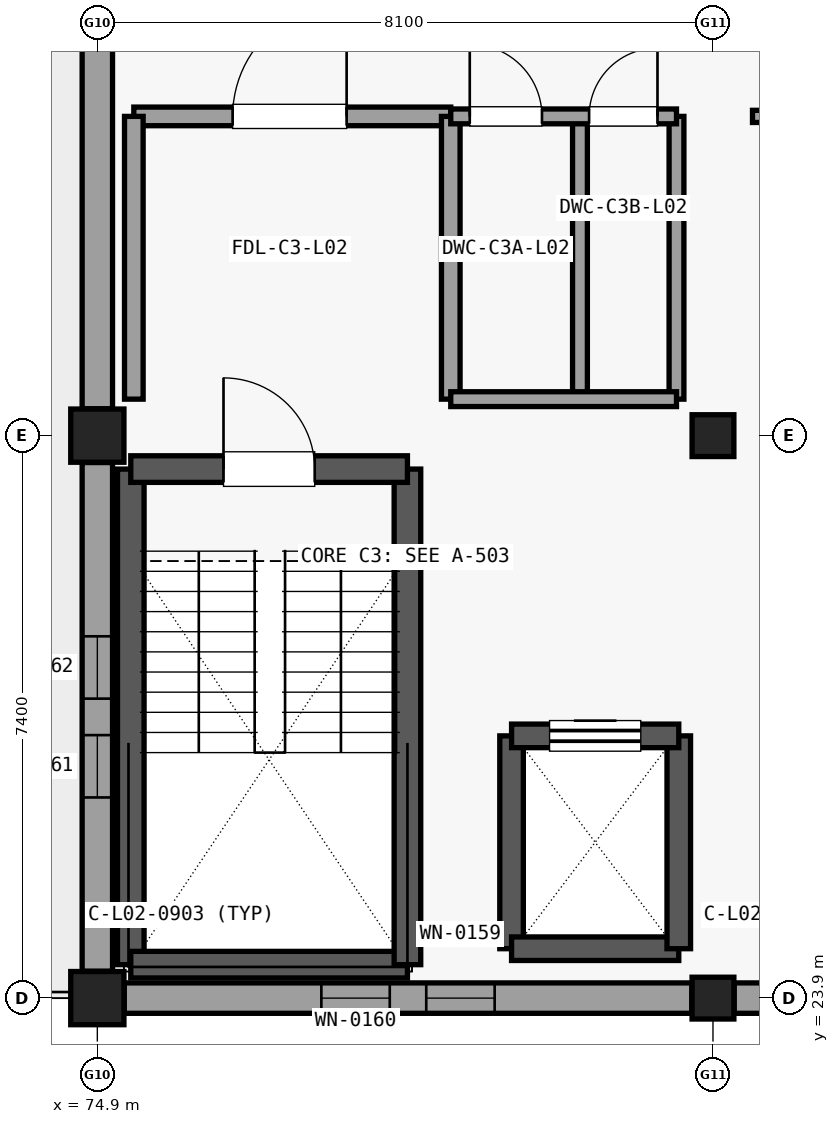
"""IFC4 building model, lengths in metres.
Left out: names, types, materials, properties, quantities, classifications, styles, units other than length and angle.
Written with IfcOpenShell. Run it as: python <this file> out.ifc"""

import sys

from ifc_helpers import new_model, si_unit, direction, frame, frame_2d, origin, origin_2d, place, context, subcontext, project, spatial, rectangle, extrude, element, fill, save


model = new_model("IFC4")
c1 = context("Model", 3, precision=1e-05, world=origin(), true_north=direction((0.0, 1.0)))
c2 = subcontext(c1, "Body", "Model", "MODEL_VIEW")
j1 = project(units=[si_unit("LENGTHUNIT", "METRE"), si_unit("PLANEANGLEUNIT", "RADIAN")], contexts=[c1])
p1 = place(None, origin())
s1 = spatial("IfcSite", under=j1, at=p1, CompositionType="ELEMENT")
p2 = place(p1, origin())
s2 = spatial("IfcBuilding", under=s1, at=p2, CompositionType="ELEMENT")
p3 = place(p2, frame((0.0, 0.0, 10.2)))
s3 = spatial("IfcBuildingStorey", under=s2, at=p3, CompositionType="ELEMENT", Elevation=10.2)
for number, where, z_axis, x_axis in (
    (1, (74.9, 23.9, 0.0), (0.0, 0.0, 1.0), (1.0, 0.0, 0.0)),
    (2, (74.9, 31.3, 0.0), (0.0, 0.0, 1.0), (1.0, 0.0, 0.0)),
):
    element("IfcColumn", number, at=place(p3, frame(where, z_axis=z_axis, x_axis=x_axis)), inside=s3, PredefinedType="COLUMN", context=c2, shape_type="SweptSolid", body=[
        extrude(rectangle(XDim=0.7, YDim=0.7, at=origin_2d()), origin(), (0.0, 0.0, 1.0), 3.37),
    ])
for number, where, z_axis, x_axis in (
    (3, (83.0, 23.9, 0.0), (0.0, 0.0, 1.0), (1.0, 0.0, 0.0)),
    (4, (83.0, 31.3, 0.0), (0.0, 0.0, 1.0), (1.0, 0.0, 0.0)),
):
    element("IfcColumn", number, at=place(p3, frame(where, z_axis=z_axis, x_axis=x_axis)), inside=s3, PredefinedType="COLUMN", context=c2, shape_type="SweptSolid", body=[
        extrude(rectangle(XDim=0.55, YDim=0.55, at=origin_2d()), origin(), (0.0, 0.0, 1.0), 3.37),
    ])
p4 = place(p3, frame((82.721, 23.9, 0.0), z_axis=(0.0, 0.0, 1.0), x_axis=(-1.0, 0.0, 0.0)))
e5 = element("IfcWall", 5, at=p4, inside=s3, PredefinedType="SOLIDWALL", context=c2, shape_type="SweptSolid", body=[
    extrude(rectangle(XDim=7.467, YDim=0.4, at=frame_2d((3.733, 0.0))), origin(), (0.0, 0.0, 1.0), 2.822),
])
p5 = place(p4, frame((2.594, 0.0, 0.6)))
e6 = element("IfcOpeningElement", 6, at=p5, cuts=e5, PredefinedType="OPENING", context=c2, shape_type="SweptSolid", body=[
    extrude(rectangle(XDim=0.9, YDim=1.98, at=frame_2d((0.45, 0.99))), frame((0.0, 0.21, 0.0), z_axis=(0.0, -1.0, 0.0), x_axis=(1.0, 0.0, 0.0)), (0.0, 0.0, 1.0), 0.42),
])
p6 = place(p4, frame((3.973, 0.0, 0.6)))
e7 = element("IfcOpeningElement", 7, at=p6, cuts=e5, PredefinedType="OPENING", context=c2, shape_type="SweptSolid", body=[
    extrude(rectangle(XDim=0.9, YDim=1.98, at=frame_2d((0.45, 0.99))), frame((0.0, 0.21, 0.0), z_axis=(0.0, -1.0, 0.0), x_axis=(1.0, 0.0, 0.0)), (0.0, 0.0, 1.0), 0.42),
])
p7 = place(p3, frame((74.9, 24.254, 0.0), z_axis=(0.0, 0.0, 1.0), x_axis=(0.0, 1.0, 0.0)))
e8 = element("IfcWall", 8, at=p7, inside=s3, PredefinedType="SOLIDWALL", context=c2, shape_type="SweptSolid", body=[
    extrude(rectangle(XDim=6.692, YDim=0.4, at=frame_2d((3.346, 0.0))), origin(), (0.0, 0.0, 1.0), 2.822),
])
p8 = place(p7, frame((2.286, 0.0, 0.6)))
e9 = element("IfcOpeningElement", 9, at=p8, cuts=e8, PredefinedType="OPENING", context=c2, shape_type="SweptSolid", body=[
    extrude(rectangle(XDim=0.82, YDim=2.0, at=frame_2d((0.41, 1.0))), frame((0.0, 0.21, 0.0), z_axis=(0.0, -1.0, 0.0), x_axis=(1.0, 0.0, 0.0)), (0.0, 0.0, 1.0), 0.42),
])
p9 = place(p7, frame((3.586, 0.0, 0.6)))
e10 = element("IfcOpeningElement", 10, at=p9, cuts=e8, PredefinedType="OPENING", context=c2, shape_type="SweptSolid", body=[
    extrude(rectangle(XDim=0.82, YDim=2.0, at=frame_2d((0.41, 1.0))), frame((0.0, 0.21, 0.0), z_axis=(0.0, -1.0, 0.0), x_axis=(1.0, 0.0, 0.0)), (0.0, 0.0, 1.0), 0.42),
])
p10 = place(p3, frame((74.9, 31.654, 0.0), z_axis=(0.0, 0.0, 1.0), x_axis=(0.0, 1.0, 0.0)))
e11 = element("IfcWall", 11, at=p10, inside=s3, PredefinedType="SOLIDWALL", context=c2, shape_type="SweptSolid", body=[
    extrude(rectangle(XDim=6.692, YDim=0.4, at=frame_2d((3.346, 0.0))), origin(), (0.0, 0.0, 1.0), 2.509),
])
p11 = place(p3, frame((90.821, 23.9, 0.0), z_axis=(0.0, 0.0, 1.0), x_axis=(-1.0, 0.0, 0.0)))
e12 = element("IfcWall", 12, at=p11, inside=s3, PredefinedType="SOLIDWALL", context=c2, shape_type="SweptSolid", body=[
    extrude(rectangle(XDim=7.542, YDim=0.4, at=frame_2d((3.771, 0.0))), origin(), (0.0, 0.0, 1.0), 2.898),
])
p12 = place(p11, frame((2.631, 0.0, 0.6)))
e13 = element("IfcOpeningElement", 13, at=p12, cuts=e12, PredefinedType="OPENING", context=c2, shape_type="SweptSolid", body=[
    extrude(rectangle(XDim=0.9, YDim=1.98, at=frame_2d((0.45, 0.99))), frame((0.0, 0.21, 0.0), z_axis=(0.0, -1.0, 0.0), x_axis=(1.0, 0.0, 0.0)), (0.0, 0.0, 1.0), 0.42),
])
p13 = place(p11, frame((4.011, 0.0, 0.6)))
e14 = element("IfcOpeningElement", 14, at=p13, cuts=e12, PredefinedType="OPENING", context=c2, shape_type="SweptSolid", body=[
    extrude(rectangle(XDim=0.9, YDim=1.98, at=frame_2d((0.45, 0.99))), frame((0.0, 0.21, 0.0), z_axis=(0.0, -1.0, 0.0), x_axis=(1.0, 0.0, 0.0)), (0.0, 0.0, 1.0), 0.42),
])
p14 = place(p3, frame((75.34, 24.34, 0.0), z_axis=(0.0, 0.0, 1.0), x_axis=(0.0, 1.0, 0.0)))
e15 = element("IfcWall", 15, at=p14, inside=s3, PredefinedType="SHEAR", context=c2, shape_type="SweptSolid", body=[
    extrude(rectangle(XDim=6.52, YDim=0.35, at=frame_2d((3.26, 0.0))), origin(), (0.0, 0.0, 1.0), 3.365),
])
p15 = place(p3, frame((75.34, 24.34, 0.0), z_axis=(0.0, 0.0, 1.0), x_axis=(1.0, 0.0, 0.0)))
e16 = element("IfcWall", 16, at=p15, inside=s3, PredefinedType="SHEAR", context=c2, shape_type="SweptSolid", body=[
    extrude(rectangle(XDim=3.64, YDim=0.35, at=frame_2d((1.82, 0.0))), origin(), (0.0, 0.0, 1.0), 3.365),
])
p16 = place(p3, frame((78.98, 24.34, 0.0), z_axis=(0.0, 0.0, 1.0), x_axis=(0.0, 1.0, 0.0)))
e17 = element("IfcWall", 17, at=p16, inside=s3, PredefinedType="SHEAR", context=c2, shape_type="SweptSolid", body=[
    extrude(rectangle(XDim=6.52, YDim=0.35, at=frame_2d((3.26, 0.0))), origin(), (0.0, 0.0, 1.0), 3.365),
])
p17 = place(p3, frame((75.34, 30.86, 0.0), z_axis=(0.0, 0.0, 1.0), x_axis=(1.0, 0.0, 0.0)))
e18 = element("IfcWall", 18, at=p17, inside=s3, PredefinedType="SHEAR", context=c2, shape_type="SweptSolid", body=[
    extrude(rectangle(XDim=3.64, YDim=0.35, at=frame_2d((1.82, 0.0))), origin(), (0.0, 0.0, 1.0), 3.365),
])
p18 = place(p17, frame((1.22, 0.0, 0.0)))
e19 = element("IfcOpeningElement", 19, at=p18, cuts=e18, PredefinedType="OPENING", context=c2, shape_type="SweptSolid", body=[
    extrude(rectangle(XDim=1.2, YDim=2.15, at=frame_2d((0.6, 1.075))), frame((0.0, 0.185, 0.0), z_axis=(0.0, -1.0, 0.0), x_axis=(1.0, 0.0, 0.0)), (0.0, 0.0, 1.0), 0.37),
])
p19 = place(p3, frame((80.35, 24.55, 0.0), z_axis=(0.0, 0.0, 1.0), x_axis=(0.0, 1.0, 0.0)))
e20 = element("IfcWall", 20, at=p19, inside=s3, PredefinedType="SHEAR", context=c2, shape_type="SweptSolid", body=[
    extrude(rectangle(XDim=2.8, YDim=0.31, at=frame_2d((1.4, 0.0))), origin(), (0.0, 0.0, 1.0), 3.365),
])
p20 = place(p3, frame((80.35, 24.55, 0.0), z_axis=(0.0, 0.0, 1.0), x_axis=(1.0, 0.0, 0.0)))
e21 = element("IfcWall", 21, at=p20, inside=s3, PredefinedType="SHEAR", context=c2, shape_type="SweptSolid", body=[
    extrude(rectangle(XDim=2.2, YDim=0.31, at=frame_2d((1.1, 0.0))), origin(), (0.0, 0.0, 1.0), 3.365),
])
p21 = place(p3, frame((82.55, 24.55, 0.0), z_axis=(0.0, 0.0, 1.0), x_axis=(0.0, 1.0, 0.0)))
e22 = element("IfcWall", 22, at=p21, inside=s3, PredefinedType="SHEAR", context=c2, shape_type="SweptSolid", body=[
    extrude(rectangle(XDim=2.8, YDim=0.31, at=frame_2d((1.4, 0.0))), origin(), (0.0, 0.0, 1.0), 3.365),
])
p22 = place(p3, frame((80.35, 27.35, 0.0), z_axis=(0.0, 0.0, 1.0), x_axis=(1.0, 0.0, 0.0)))
e23 = element("IfcWall", 23, at=p22, inside=s3, PredefinedType="SHEAR", context=c2, shape_type="SweptSolid", body=[
    extrude(rectangle(XDim=2.2, YDim=0.31, at=frame_2d((1.1, 0.0))), origin(), (0.0, 0.0, 1.0), 3.365),
])
p23 = place(p22, frame((0.5, 0.0, 0.0)))
e24 = element("IfcOpeningElement", 24, at=p23, cuts=e23, PredefinedType="OPENING", context=c2, shape_type="SweptSolid", body=[
    extrude(rectangle(XDim=1.2, YDim=2.15, at=frame_2d((0.6, 1.075))), frame((0.0, 0.165, 0.0), z_axis=(0.0, -1.0, 0.0), x_axis=(1.0, 0.0, 0.0)), (0.0, 0.0, 1.0), 0.33),
])
p24 = place(p3, frame((75.38, 35.5, 0.0), z_axis=(0.0, 0.0, 1.0), x_axis=(1.0, 0.0, 0.0)))
e25 = element("IfcWall", 25, at=p24, inside=s3, PredefinedType="PARTITIONING", context=c2, shape_type="SweptSolid", body=[
    extrude(rectangle(XDim=4.17, YDim=0.245, at=frame_2d((2.085, 0.0))), origin(), (0.0, 0.0, 1.0), 2.827),
])
p25 = place(p24, frame((1.3, 0.0, 0.0)))
e26 = element("IfcOpeningElement", 26, at=p25, cuts=e25, PredefinedType="OPENING", context=c2, shape_type="SweptSolid", body=[
    extrude(rectangle(XDim=1.5, YDim=2.15, at=frame_2d((0.75, 1.075))), frame((0.0, 0.133, 0.0), z_axis=(0.0, -1.0, 0.0), x_axis=(1.0, 0.0, 0.0)), (0.0, 0.0, 1.0), 0.265),
])
p26 = place(p3, frame((75.38, 31.78, 0.0), z_axis=(0.0, 0.0, 1.0), x_axis=(0.0, 1.0, 0.0)))
e27 = element("IfcWall", 27, at=p26, inside=s3, PredefinedType="PARTITIONING", context=c2, shape_type="SweptSolid", body=[
    extrude(rectangle(XDim=3.72, YDim=0.245, at=frame_2d((1.86, 0.0))), origin(), (0.0, 0.0, 1.0), 2.827),
])
p27 = place(p3, frame((79.55, 31.78, 0.0), z_axis=(0.0, 0.0, 1.0), x_axis=(0.0, 1.0, 0.0)))
e28 = element("IfcWall", 28, at=p27, inside=s3, PredefinedType="PARTITIONING", context=c2, shape_type="SweptSolid", body=[
    extrude(rectangle(XDim=3.72, YDim=0.245, at=frame_2d((1.86, 0.0))), origin(), (0.0, 0.0, 1.0), 2.903),
])
for number, where, z_axis, x_axis in (
    (29, (81.25, 31.78, 0.0), (0.0, 0.0, 1.0), (0.0, 1.0, 0.0)),
    (30, (82.52, 31.78, 0.0), (0.0, 0.0, 1.0), (0.0, 1.0, 0.0)),
):
    element("IfcWall", number, at=place(p3, frame(where, z_axis=z_axis, x_axis=x_axis)), inside=s3, PredefinedType="PARTITIONING", context=c2, shape_type="SweptSolid", body=[
        extrude(rectangle(XDim=3.72, YDim=0.195, at=frame_2d((1.86, 0.0))), origin(), (0.0, 0.0, 1.0), 2.903),
    ])
p28 = place(p3, frame((79.55, 31.78, 0.0), z_axis=(0.0, 0.0, 1.0), x_axis=(1.0, 0.0, 0.0)))
e31 = element("IfcWall", 31, at=p28, inside=s3, PredefinedType="PARTITIONING", context=c2, shape_type="SweptSolid", body=[
    extrude(rectangle(XDim=2.97, YDim=0.195, at=frame_2d((1.485, 0.0))), origin(), (0.0, 0.0, 1.0), 2.903),
])
p29 = place(p3, frame((79.55, 35.5, 0.0), z_axis=(0.0, 0.0, 1.0), x_axis=(1.0, 0.0, 0.0)))
e32 = element("IfcWall", 32, at=p29, inside=s3, PredefinedType="PARTITIONING", context=c2, shape_type="SweptSolid", body=[
    extrude(rectangle(XDim=2.97, YDim=0.195, at=frame_2d((1.485, 0.0))), origin(), (0.0, 0.0, 1.0), 3.355),
])
p30 = place(p29, frame((0.25, 0.0, 0.0)))
e33 = element("IfcOpeningElement", 33, at=p30, cuts=e32, PredefinedType="OPENING", context=c2, shape_type="SweptSolid", body=[
    extrude(rectangle(XDim=0.95, YDim=2.1, at=frame_2d((0.475, 1.05))), frame((0.0, 0.107, 0.0), z_axis=(0.0, -1.0, 0.0), x_axis=(1.0, 0.0, 0.0)), (0.0, 0.0, 1.0), 0.215),
])
p31 = place(p29, frame((1.82, 0.0, 0.0)))
e34 = element("IfcOpeningElement", 34, at=p31, cuts=e32, PredefinedType="OPENING", context=c2, shape_type="SweptSolid", body=[
    extrude(rectangle(XDim=0.9, YDim=2.1, at=frame_2d((0.45, 1.05))), frame((0.0, 0.107, 0.0), z_axis=(0.0, -1.0, 0.0), x_axis=(1.0, 0.0, 0.0)), (0.0, 0.0, 1.0), 0.215),
])
p32 = place(p3, frame((83.52, 35.5, 0.0), z_axis=(0.0, 0.0, 1.0), x_axis=(1.0, 0.0, 0.0)))
e35 = element("IfcWall", 35, at=p32, inside=s3, PredefinedType="PARTITIONING", context=c2, shape_type="SweptSolid", body=[
    extrude(rectangle(XDim=7.06, YDim=0.16, at=frame_2d((3.53, 0.0))), origin(), (0.0, 0.0, 1.0), 3.355),
])
p33 = place(p32, frame((2.855, 0.0, 0.0)))
e36 = element("IfcOpeningElement", 36, at=p33, cuts=e35, PredefinedType="OPENING", context=c2, shape_type="SweptSolid", body=[
    extrude(rectangle(XDim=1.35, YDim=2.2, at=frame_2d((0.675, 1.1))), frame((0.0, 0.09, 0.0), z_axis=(0.0, -1.0, 0.0), x_axis=(1.0, 0.0, 0.0)), (0.0, 0.0, 1.0), 0.18),
])
p34 = place(p5, origin())
e37 = element("IfcWindow", 37, at=p34, inside=s3, PartitioningType="SINGLE_PANEL", PredefinedType="WINDOW", context=c2, shape_type="SweptSolid", body=[
    extrude(rectangle(XDim=0.9, YDim=1.98, at=frame_2d((0.45, 0.99))), frame((0.0, 0.03, 0.0), z_axis=(0.0, -1.0, 0.0), x_axis=(1.0, 0.0, 0.0)), (0.0, 0.0, 1.0), 0.06),
])
fill(e6, e37)
p35 = place(p6, origin())
e38 = element("IfcWindow", 38, at=p35, inside=s3, PartitioningType="SINGLE_PANEL", PredefinedType="WINDOW", context=c2, shape_type="SweptSolid", body=[
    extrude(rectangle(XDim=0.9, YDim=1.98, at=frame_2d((0.45, 0.99))), frame((0.0, 0.03, 0.0), z_axis=(0.0, -1.0, 0.0), x_axis=(1.0, 0.0, 0.0)), (0.0, 0.0, 1.0), 0.06),
])
fill(e7, e38)
p36 = place(p8, origin())
e39 = element("IfcWindow", 39, at=p36, inside=s3, PartitioningType="SINGLE_PANEL", PredefinedType="WINDOW", context=c2, shape_type="SweptSolid", body=[
    extrude(rectangle(XDim=0.82, YDim=2.0, at=frame_2d((0.41, 1.0))), frame((0.0, 0.03, 0.0), z_axis=(0.0, -1.0, 0.0), x_axis=(1.0, 0.0, 0.0)), (0.0, 0.0, 1.0), 0.06),
])
fill(e9, e39)
p37 = place(p9, origin())
e40 = element("IfcWindow", 40, at=p37, inside=s3, PartitioningType="SINGLE_PANEL", PredefinedType="WINDOW", context=c2, shape_type="SweptSolid", body=[
    extrude(rectangle(XDim=0.82, YDim=2.0, at=frame_2d((0.41, 1.0))), frame((0.0, 0.03, 0.0), z_axis=(0.0, -1.0, 0.0), x_axis=(1.0, 0.0, 0.0)), (0.0, 0.0, 1.0), 0.06),
])
fill(e10, e40)
p38 = place(p18, origin())
e41 = element("IfcDoor", 41, at=p38, inside=s3, OperationType="SINGLE_SWING_LEFT", PredefinedType="DOOR", context=c2, shape_type="SweptSolid", body=[
    extrude(rectangle(XDim=1.2, YDim=2.15, at=frame_2d((0.6, 1.075))), frame((0.0, 0.025, 0.0), z_axis=(0.0, -1.0, 0.0), x_axis=(1.0, 0.0, 0.0)), (0.0, 0.0, 1.0), 0.05),
])
fill(e19, e41)
p39 = place(p23, origin())
e42 = element("IfcDoor", 42, at=p39, inside=s3, OperationType="SLIDING_TO_RIGHT", PredefinedType="DOOR", context=c2, shape_type="SweptSolid", body=[
    extrude(rectangle(XDim=1.2, YDim=2.15, at=frame_2d((0.6, 1.075))), frame((0.0, 0.025, 0.0), z_axis=(0.0, -1.0, 0.0), x_axis=(1.0, 0.0, 0.0)), (0.0, 0.0, 1.0), 0.05),
])
fill(e24, e42)
p40 = place(p25, origin())
e43 = element("IfcDoor", 43, at=p40, inside=s3, OperationType="SINGLE_SWING_RIGHT", PredefinedType="DOOR", context=c2, shape_type="SweptSolid", body=[
    extrude(rectangle(XDim=1.5, YDim=2.15, at=frame_2d((0.75, 1.075))), frame((0.0, 0.025, 0.0), z_axis=(0.0, -1.0, 0.0), x_axis=(1.0, 0.0, 0.0)), (0.0, 0.0, 1.0), 0.05),
])
fill(e26, e43)
p41 = place(p30, origin())
e44 = element("IfcDoor", 44, at=p41, inside=s3, OperationType="SINGLE_SWING_LEFT", PredefinedType="DOOR", context=c2, shape_type="SweptSolid", body=[
    extrude(rectangle(XDim=0.95, YDim=2.1, at=frame_2d((0.475, 1.05))), frame((0.0, 0.025, 0.0), z_axis=(0.0, -1.0, 0.0), x_axis=(1.0, 0.0, 0.0)), (0.0, 0.0, 1.0), 0.05),
])
fill(e33, e44)
p42 = place(p31, origin())
e45 = element("IfcDoor", 45, at=p42, inside=s3, OperationType="SINGLE_SWING_RIGHT", PredefinedType="DOOR", context=c2, shape_type="SweptSolid", body=[
    extrude(rectangle(XDim=0.9, YDim=2.1, at=frame_2d((0.45, 1.05))), frame((0.0, 0.025, 0.0), z_axis=(0.0, -1.0, 0.0), x_axis=(1.0, 0.0, 0.0)), (0.0, 0.0, 1.0), 0.05),
])
fill(e34, e45)
save(model, sys.argv[1])
